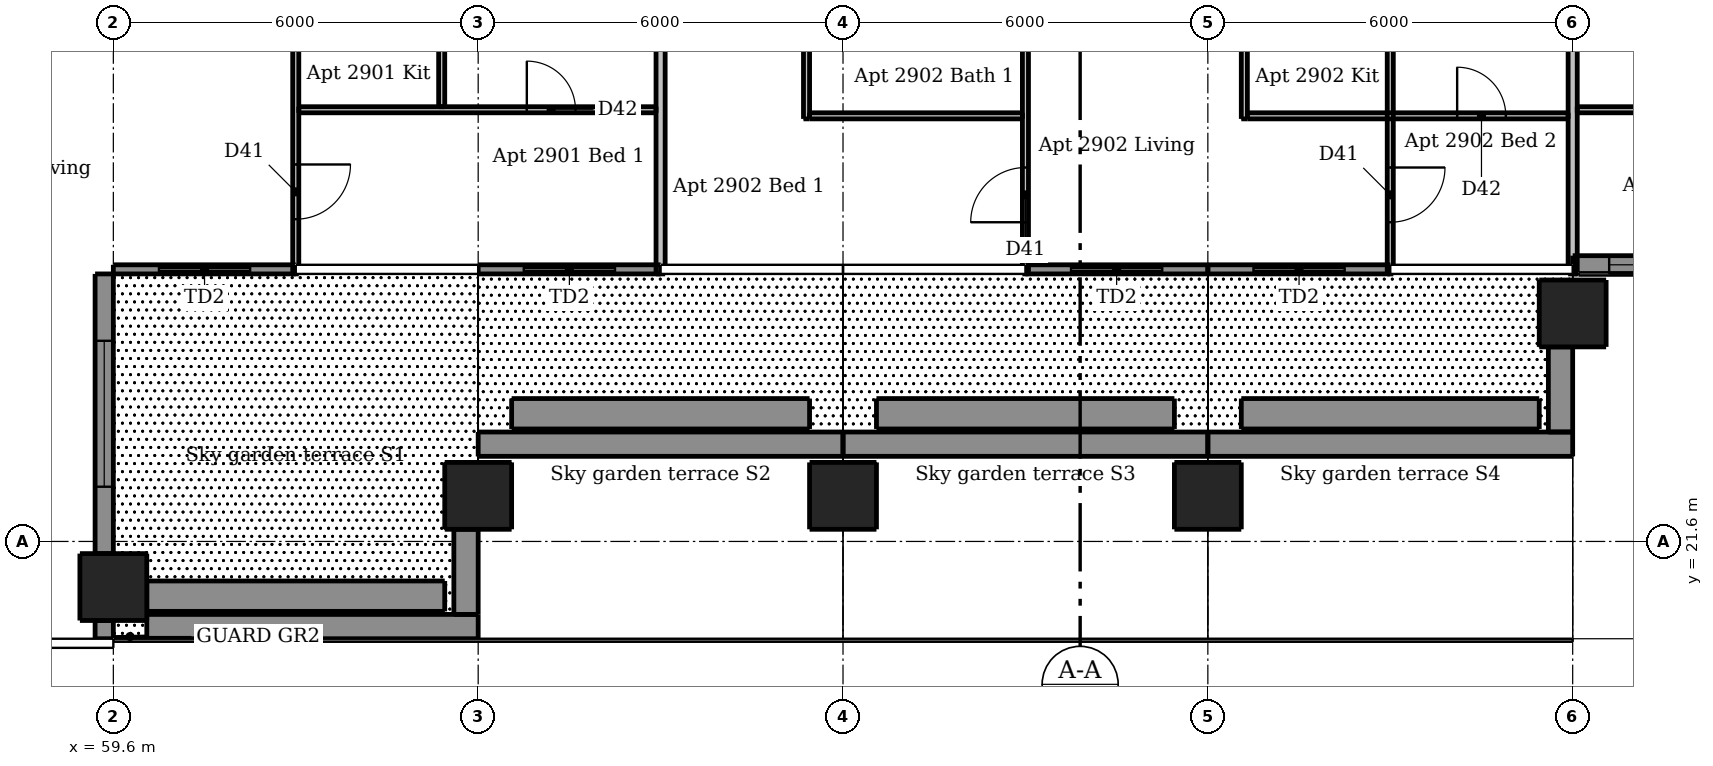
"""IFC4 building model, lengths in metres.
Left out: names, types, materials, properties, quantities, classifications, styles, units other than length and angle.
Written with IfcOpenShell. Run it as: python <this file> out.ifc"""

import sys

from ifc_helpers import new_model, si_unit, direction, frame, frame_2d, origin, origin_2d, place, context, subcontext, project, spatial, rectangle, extrude, element, fill, save


model = new_model("IFC4")
c1 = context("Model", 3, precision=1e-05, world=origin(), true_north=direction((0.0, 1.0)))
c2 = subcontext(c1, "Body", "Model", "MODEL_VIEW")
j1 = project(units=[si_unit("LENGTHUNIT", "METRE"), si_unit("PLANEANGLEUNIT", "RADIAN")], contexts=[c1])
p1 = place(None, origin())
s1 = spatial("IfcSite", under=j1, at=p1, CompositionType="ELEMENT")
p2 = place(p1, origin())
s2 = spatial("IfcBuilding", under=s1, at=p2, CompositionType="ELEMENT")
p3 = place(p2, frame((0.0, 0.0, 108.4)))
s3 = spatial("IfcBuildingStorey", under=s2, at=p3, CompositionType="ELEMENT", Elevation=108.4)
for number, where, z_axis, x_axis in (
    (1, (59.6, 20.85, 0.0), (0.0, 0.0, 1.0), (1.0, 0.0, 0.0)),
    (2, (65.6, 22.35, 0.0), (0.0, 0.0, 1.0), (1.0, 0.0, 0.0)),
    (3, (71.6, 22.35, 0.0), (0.0, 0.0, 1.0), (1.0, 0.0, 0.0)),
    (4, (77.6, 22.35, 0.0), (0.0, 0.0, 1.0), (1.0, 0.0, 0.0)),
    (5, (83.6, 25.35, 0.0), (0.0, 0.0, 1.0), (1.0, 0.0, 0.0)),
):
    element("IfcColumn", number, at=place(p3, frame(where, z_axis=z_axis, x_axis=x_axis)), inside=s3, PredefinedType="COLUMN", context=c2, shape_type="SweptSolid", body=[
        extrude(rectangle(XDim=1.1, YDim=1.1, at=origin_2d()), origin(), (0.0, 0.0, 1.0), 3.3),
    ])
p4 = place(p3, frame((59.45, 20.0, 0.0), z_axis=(0.0, 0.0, 1.0), x_axis=(0.0, 1.0, 0.0)))
e6 = element("IfcWall", 6, at=p4, inside=s3, PredefinedType="SOLIDWALL", context=c2, shape_type="SweptSolid", body=[
    extrude(rectangle(XDim=0.3, YDim=0.3, at=frame_2d((0.15, 0.0))), origin(), (0.0, 0.0, 1.0), 3.05),
])
p5 = place(p3, frame((59.45, 21.4, 0.0), z_axis=(0.0, 0.0, 1.0), x_axis=(0.0, 1.0, 0.0)))
e7 = element("IfcWall", 7, at=p5, inside=s3, PredefinedType="SOLIDWALL", context=c2, shape_type="SweptSolid", body=[
    extrude(rectangle(XDim=4.6, YDim=0.3, at=frame_2d((2.3, 0.0))), origin(), (0.0, 0.0, 1.0), 3.05),
])
p6 = place(p5, frame((1.1, 0.0, 0.15)))
e8 = element("IfcOpeningElement", 8, at=p6, cuts=e7, PredefinedType="OPENING", context=c2, shape_type="SweptSolid", body=[
    extrude(rectangle(XDim=2.4, YDim=2.1, at=frame_2d((1.2, 1.05))), frame((0.0, 0.16, 0.0), z_axis=(0.0, -1.0, 0.0), x_axis=(1.0, 0.0, 0.0)), (0.0, 0.0, 1.0), 0.32),
])
p7 = place(p3, frame((59.6, 26.075, 0.0), z_axis=(0.0, 0.0, 1.0), x_axis=(1.0, 0.0, 0.0)))
e9 = element("IfcWall", 9, at=p7, inside=s3, PredefinedType="SOLIDWALL", context=c2, shape_type="SweptSolid", body=[
    extrude(rectangle(XDim=3.0, YDim=0.15, at=frame_2d((1.5, 0.0))), origin(), (0.0, 0.0, 1.0), 3.05),
])
p8 = place(p7, frame((0.75, 0.0, 0.0)))
e10 = element("IfcOpeningElement", 10, at=p8, cuts=e9, PredefinedType="OPENING", context=c2, shape_type="SweptSolid", body=[
    extrude(rectangle(XDim=1.5, YDim=2.4, at=frame_2d((0.75, 1.2))), frame((0.0, 0.085, 0.0), z_axis=(0.0, -1.0, 0.0), x_axis=(1.0, 0.0, 0.0)), (0.0, 0.0, 1.0), 0.17),
])
p9 = place(p3, frame((65.6, 26.075, 0.0), z_axis=(0.0, 0.0, 1.0), x_axis=(1.0, 0.0, 0.0)))
e11 = element("IfcWall", 11, at=p9, inside=s3, PredefinedType="SOLIDWALL", context=c2, shape_type="SweptSolid", body=[
    extrude(rectangle(XDim=3.0, YDim=0.15, at=frame_2d((1.5, 0.0))), origin(), (0.0, 0.0, 1.0), 3.05),
])
p10 = place(p9, frame((0.75, 0.0, 0.0)))
e12 = element("IfcOpeningElement", 12, at=p10, cuts=e11, PredefinedType="OPENING", context=c2, shape_type="SweptSolid", body=[
    extrude(rectangle(XDim=1.5, YDim=2.4, at=frame_2d((0.75, 1.2))), frame((0.0, 0.085, 0.0), z_axis=(0.0, -1.0, 0.0), x_axis=(1.0, 0.0, 0.0)), (0.0, 0.0, 1.0), 0.17),
])
p11 = place(p3, frame((74.6, 26.075, 0.0), z_axis=(0.0, 0.0, 1.0), x_axis=(1.0, 0.0, 0.0)))
e13 = element("IfcWall", 13, at=p11, inside=s3, PredefinedType="SOLIDWALL", context=c2, shape_type="SweptSolid", body=[
    extrude(rectangle(XDim=3.0, YDim=0.15, at=frame_2d((1.5, 0.0))), origin(), (0.0, 0.0, 1.0), 3.05),
])
p12 = place(p11, frame((0.75, 0.0, 0.0)))
e14 = element("IfcOpeningElement", 14, at=p12, cuts=e13, PredefinedType="OPENING", context=c2, shape_type="SweptSolid", body=[
    extrude(rectangle(XDim=1.5, YDim=2.4, at=frame_2d((0.75, 1.2))), frame((0.0, 0.085, 0.0), z_axis=(0.0, -1.0, 0.0), x_axis=(1.0, 0.0, 0.0)), (0.0, 0.0, 1.0), 0.17),
])
p13 = place(p3, frame((77.6, 26.075, 0.0), z_axis=(0.0, 0.0, 1.0), x_axis=(1.0, 0.0, 0.0)))
e15 = element("IfcWall", 15, at=p13, inside=s3, PredefinedType="SOLIDWALL", context=c2, shape_type="SweptSolid", body=[
    extrude(rectangle(XDim=3.0, YDim=0.15, at=frame_2d((1.5, 0.0))), origin(), (0.0, 0.0, 1.0), 3.05),
])
p14 = place(p13, frame((0.75, 0.0, 0.0)))
e16 = element("IfcOpeningElement", 16, at=p14, cuts=e15, PredefinedType="OPENING", context=c2, shape_type="SweptSolid", body=[
    extrude(rectangle(XDim=1.5, YDim=2.4, at=frame_2d((0.75, 1.2))), frame((0.0, 0.085, 0.0), z_axis=(0.0, -1.0, 0.0), x_axis=(1.0, 0.0, 0.0)), (0.0, 0.0, 1.0), 0.17),
])
p15 = place(p3, frame((83.6, 26.15, 0.0), z_axis=(0.0, 0.0, 1.0), x_axis=(1.0, 0.0, 0.0)))
e17 = element("IfcWall", 17, at=p15, inside=s3, PredefinedType="SOLIDWALL", context=c2, shape_type="SweptSolid", body=[
    extrude(rectangle(XDim=5.89, YDim=0.3, at=frame_2d((2.945, 0.0))), origin(), (0.0, 0.0, 1.0), 3.05),
])
p16 = place(p15, frame((0.6, 0.0, 0.15)))
e18 = element("IfcOpeningElement", 18, at=p16, cuts=e17, PredefinedType="OPENING", context=c2, shape_type="SweptSolid", body=[
    extrude(rectangle(XDim=1.8, YDim=2.1, at=frame_2d((0.9, 1.05))), frame((0.0, 0.16, 0.0), z_axis=(0.0, -1.0, 0.0), x_axis=(1.0, 0.0, 0.0)), (0.0, 0.0, 1.0), 0.32),
])
p17 = place(p15, frame((3.6, 0.0, 0.15)))
e19 = element("IfcOpeningElement", 19, at=p17, cuts=e17, PredefinedType="OPENING", context=c2, shape_type="SweptSolid", body=[
    extrude(rectangle(XDim=1.8, YDim=2.1, at=frame_2d((0.9, 1.05))), frame((0.0, 0.16, 0.0), z_axis=(0.0, -1.0, 0.0), x_axis=(1.0, 0.0, 0.0)), (0.0, 0.0, 1.0), 0.32),
])
p18 = place(p3, frame((60.15, 20.2, 0.03), z_axis=(0.0, 0.0, 1.0), x_axis=(1.0, 0.0, 0.0)))
e20 = element("IfcWall", 20, at=p18, inside=s3, PredefinedType="PARAPET", context=c2, shape_type="SweptSolid", body=[
    extrude(rectangle(XDim=5.45, YDim=0.4, at=frame_2d((2.725, 0.0))), origin(), (0.0, 0.0, 1.0), 1.1),
])
p19 = place(p3, frame((65.4, 20.4, 0.03), z_axis=(0.0, 0.0, 1.0), x_axis=(0.0, 1.0, 0.0)))
e21 = element("IfcWall", 21, at=p19, inside=s3, PredefinedType="PARAPET", context=c2, shape_type="SweptSolid", body=[
    extrude(rectangle(XDim=1.4, YDim=0.4, at=frame_2d((0.7, 0.0))), origin(), (0.0, 0.0, 1.0), 1.1),
])
p20 = place(p3, frame((60.15, 20.7, 0.03), z_axis=(0.0, 0.0, 1.0), x_axis=(1.0, 0.0, 0.0)))
e22 = element("IfcWall", 22, at=p20, inside=s3, PredefinedType="SOLIDWALL", context=c2, shape_type="SweptSolid", body=[
    extrude(rectangle(XDim=4.9, YDim=0.5, at=frame_2d((2.45, 0.0))), origin(), (0.0, 0.0, 1.0), 0.6),
])
p21 = place(p3, frame((65.6, 23.2, 0.03), z_axis=(0.0, 0.0, 1.0), x_axis=(1.0, 0.0, 0.0)))
e23 = element("IfcWall", 23, at=p21, inside=s3, PredefinedType="PARAPET", context=c2, shape_type="SweptSolid", body=[
    extrude(rectangle(XDim=6.0, YDim=0.4, at=frame_2d((3.0, 0.0))), origin(), (0.0, 0.0, 1.0), 1.1),
])
p22 = place(p3, frame((66.15, 23.7, 0.03), z_axis=(0.0, 0.0, 1.0), x_axis=(1.0, 0.0, 0.0)))
e24 = element("IfcWall", 24, at=p22, inside=s3, PredefinedType="SOLIDWALL", context=c2, shape_type="SweptSolid", body=[
    extrude(rectangle(XDim=4.9, YDim=0.5, at=frame_2d((2.45, 0.0))), origin(), (0.0, 0.0, 1.0), 0.6),
])
p23 = place(p3, frame((71.6, 23.2, 0.03), z_axis=(0.0, 0.0, 1.0), x_axis=(1.0, 0.0, 0.0)))
e25 = element("IfcWall", 25, at=p23, inside=s3, PredefinedType="PARAPET", context=c2, shape_type="SweptSolid", body=[
    extrude(rectangle(XDim=6.0, YDim=0.4, at=frame_2d((3.0, 0.0))), origin(), (0.0, 0.0, 1.0), 1.1),
])
p24 = place(p3, frame((72.15, 23.7, 0.03), z_axis=(0.0, 0.0, 1.0), x_axis=(1.0, 0.0, 0.0)))
e26 = element("IfcWall", 26, at=p24, inside=s3, PredefinedType="SOLIDWALL", context=c2, shape_type="SweptSolid", body=[
    extrude(rectangle(XDim=4.9, YDim=0.5, at=frame_2d((2.45, 0.0))), origin(), (0.0, 0.0, 1.0), 0.6),
])
p25 = place(p3, frame((77.6, 23.2, 0.03), z_axis=(0.0, 0.0, 1.0), x_axis=(1.0, 0.0, 0.0)))
e27 = element("IfcWall", 27, at=p25, inside=s3, PredefinedType="PARAPET", context=c2, shape_type="SweptSolid", body=[
    extrude(rectangle(XDim=6.0, YDim=0.4, at=frame_2d((3.0, 0.0))), origin(), (0.0, 0.0, 1.0), 1.1),
])
p26 = place(p3, frame((83.4, 23.4, 0.03), z_axis=(0.0, 0.0, 1.0), x_axis=(0.0, 1.0, 0.0)))
e28 = element("IfcWall", 28, at=p26, inside=s3, PredefinedType="PARAPET", context=c2, shape_type="SweptSolid", body=[
    extrude(rectangle(XDim=1.4, YDim=0.4, at=frame_2d((0.7, 0.0))), origin(), (0.0, 0.0, 1.0), 1.1),
])
p27 = place(p3, frame((78.15, 23.7, 0.03), z_axis=(0.0, 0.0, 1.0), x_axis=(1.0, 0.0, 0.0)))
e29 = element("IfcWall", 29, at=p27, inside=s3, PredefinedType="SOLIDWALL", context=c2, shape_type="SweptSolid", body=[
    extrude(rectangle(XDim=4.9, YDim=0.5, at=frame_2d((2.45, 0.0))), origin(), (0.0, 0.0, 1.0), 0.6),
])
p28 = place(p3, frame((62.6, 31.625, 0.0), z_axis=(0.0, 0.0, 1.0), x_axis=(0.0, -1.0, 0.0)))
e30 = element("IfcWall", 30, at=p28, inside=s3, PredefinedType="PARTITIONING", context=c2, shape_type="SweptSolid", body=[
    extrude(rectangle(XDim=5.625, YDim=0.1, at=frame_2d((2.812, 0.0))), origin(), (0.0, 0.0, 1.0), 3.05),
])
p29 = place(p28, frame((0.975, 0.0, 0.0)))
e31 = element("IfcOpeningElement", 31, at=p29, cuts=e30, PredefinedType="OPENING", context=c2, shape_type="SweptSolid", body=[
    extrude(rectangle(XDim=0.9, YDim=2.1, at=frame_2d((0.45, 1.05))), frame((0.0, 0.06, 0.0), z_axis=(0.0, -1.0, 0.0), x_axis=(1.0, 0.0, 0.0)), (0.0, 0.0, 1.0), 0.12),
])
p30 = place(p28, frame((3.825, 0.0, 0.0)))
e32 = element("IfcOpeningElement", 32, at=p30, cuts=e30, PredefinedType="OPENING", context=c2, shape_type="SweptSolid", body=[
    extrude(rectangle(XDim=0.9, YDim=2.1, at=frame_2d((0.45, 1.05))), frame((0.0, 0.06, 0.0), z_axis=(0.0, -1.0, 0.0), x_axis=(1.0, 0.0, 0.0)), (0.0, 0.0, 1.0), 0.12),
])
p31 = place(p3, frame((65.0, 28.75, 0.0), z_axis=(0.0, 0.0, 1.0), x_axis=(0.0, 1.0, 0.0)))
e33 = element("IfcWall", 33, at=p31, inside=s3, PredefinedType="PARTITIONING", context=c2, shape_type="SweptSolid", body=[
    extrude(rectangle(XDim=2.875, YDim=0.1, at=frame_2d((1.438, 0.0))), origin(), (0.0, 0.0, 1.0), 3.05),
])
p32 = place(p3, frame((71.0, 28.55, 0.0), z_axis=(0.0, 0.0, 1.0), x_axis=(0.0, 1.0, 0.0)))
e34 = element("IfcWall", 34, at=p32, inside=s3, PredefinedType="PARTITIONING", context=c2, shape_type="SweptSolid", body=[
    extrude(rectangle(XDim=3.075, YDim=0.1, at=frame_2d((1.538, 0.0))), origin(), (0.0, 0.0, 1.0), 3.05),
])
p33 = place(p3, frame((74.6, 26.0, 0.0), z_axis=(0.0, 0.0, 1.0), x_axis=(0.0, 1.0, 0.0)))
e35 = element("IfcWall", 35, at=p33, inside=s3, PredefinedType="PARTITIONING", context=c2, shape_type="SweptSolid", body=[
    extrude(rectangle(XDim=5.625, YDim=0.1, at=frame_2d((2.812, 0.0))), origin(), (0.0, 0.0, 1.0), 3.05),
])
p34 = place(p33, frame((0.85, 0.0, 0.0)))
e36 = element("IfcOpeningElement", 36, at=p34, cuts=e35, PredefinedType="OPENING", context=c2, shape_type="SweptSolid", body=[
    extrude(rectangle(XDim=0.9, YDim=2.1, at=frame_2d((0.45, 1.05))), frame((0.0, 0.06, 0.0), z_axis=(0.0, -1.0, 0.0), x_axis=(1.0, 0.0, 0.0)), (0.0, 0.0, 1.0), 0.12),
])
p35 = place(p33, frame((3.75, 0.0, 0.0)))
e37 = element("IfcOpeningElement", 37, at=p35, cuts=e35, PredefinedType="OPENING", context=c2, shape_type="SweptSolid", body=[
    extrude(rectangle(XDim=0.8, YDim=2.1, at=frame_2d((0.4, 1.05))), frame((0.0, 0.06, 0.0), z_axis=(0.0, -1.0, 0.0), x_axis=(1.0, 0.0, 0.0)), (0.0, 0.0, 1.0), 0.12),
])
p36 = place(p3, frame((78.2, 31.625, 0.0), z_axis=(0.0, 0.0, 1.0), x_axis=(0.0, -1.0, 0.0)))
e38 = element("IfcWall", 38, at=p36, inside=s3, PredefinedType="PARTITIONING", context=c2, shape_type="SweptSolid", body=[
    extrude(rectangle(XDim=3.075, YDim=0.1, at=frame_2d((1.538, 0.0))), origin(), (0.0, 0.0, 1.0), 3.05),
])
p37 = place(p36, frame((1.025, 0.0, 0.0)))
e39 = element("IfcOpeningElement", 39, at=p37, cuts=e38, PredefinedType="OPENING", context=c2, shape_type="SweptSolid", body=[
    extrude(rectangle(XDim=0.9, YDim=2.1, at=frame_2d((0.45, 1.05))), frame((0.0, 0.06, 0.0), z_axis=(0.0, -1.0, 0.0), x_axis=(1.0, 0.0, 0.0)), (0.0, 0.0, 1.0), 0.12),
])
p38 = place(p3, frame((80.6, 31.625, 0.0), z_axis=(0.0, 0.0, 1.0), x_axis=(0.0, -1.0, 0.0)))
e40 = element("IfcWall", 40, at=p38, inside=s3, PredefinedType="PARTITIONING", context=c2, shape_type="SweptSolid", body=[
    extrude(rectangle(XDim=5.625, YDim=0.1, at=frame_2d((2.812, 0.0))), origin(), (0.0, 0.0, 1.0), 3.05),
])
p39 = place(p38, frame((3.875, 0.0, 0.0)))
e41 = element("IfcOpeningElement", 41, at=p39, cuts=e40, PredefinedType="OPENING", context=c2, shape_type="SweptSolid", body=[
    extrude(rectangle(XDim=0.9, YDim=2.1, at=frame_2d((0.45, 1.05))), frame((0.0, 0.06, 0.0), z_axis=(0.0, -1.0, 0.0), x_axis=(1.0, 0.0, 0.0)), (0.0, 0.0, 1.0), 0.12),
])
p40 = place(p3, frame((62.65, 28.7, 0.0), z_axis=(0.0, 0.0, 1.0), x_axis=(1.0, 0.0, 0.0)))
e42 = element("IfcWall", 42, at=p40, inside=s3, PredefinedType="PARTITIONING", context=c2, shape_type="SweptSolid", body=[
    extrude(rectangle(XDim=5.875, YDim=0.1, at=frame_2d((2.938, 0.0))), origin(), (0.0, 0.0, 1.0), 3.05),
])
p41 = place(p40, frame((3.75, 0.0, 0.0)))
e43 = element("IfcOpeningElement", 43, at=p41, cuts=e42, PredefinedType="OPENING", context=c2, shape_type="SweptSolid", body=[
    extrude(rectangle(XDim=0.8, YDim=2.1, at=frame_2d((0.4, 1.05))), frame((0.0, 0.06, 0.0), z_axis=(0.0, -1.0, 0.0), x_axis=(1.0, 0.0, 0.0)), (0.0, 0.0, 1.0), 0.12),
])
p42 = place(p3, frame((83.675, 28.7, 0.0), z_axis=(0.0, 0.0, 1.0), x_axis=(1.0, 0.0, 0.0)))
e44 = element("IfcWall", 44, at=p42, inside=s3, PredefinedType="PARTITIONING", context=c2, shape_type="SweptSolid", body=[
    extrude(rectangle(XDim=1.975, YDim=0.1, at=frame_2d((0.987, 0.0))), origin(), (0.0, 0.0, 1.0), 3.05),
])
p43 = place(p3, frame((71.05, 28.6, 0.0), z_axis=(0.0, 0.0, 1.0), x_axis=(1.0, 0.0, 0.0)))
e45 = element("IfcWall", 45, at=p43, inside=s3, PredefinedType="PARTITIONING", context=c2, shape_type="SweptSolid", body=[
    extrude(rectangle(XDim=3.5, YDim=0.1, at=frame_2d((1.75, 0.0))), origin(), (0.0, 0.0, 1.0), 3.05),
])
p44 = place(p3, frame((78.25, 28.6, 0.0), z_axis=(0.0, 0.0, 1.0), x_axis=(1.0, 0.0, 0.0)))
e46 = element("IfcWall", 46, at=p44, inside=s3, PredefinedType="PARTITIONING", context=c2, shape_type="SweptSolid", body=[
    extrude(rectangle(XDim=5.275, YDim=0.1, at=frame_2d((2.637, 0.0))), origin(), (0.0, 0.0, 1.0), 3.05),
])
p45 = place(p44, frame((3.45, 0.0, 0.0)))
e47 = element("IfcOpeningElement", 47, at=p45, cuts=e46, PredefinedType="OPENING", context=c2, shape_type="SweptSolid", body=[
    extrude(rectangle(XDim=0.8, YDim=2.1, at=frame_2d((0.4, 1.05))), frame((0.0, 0.06, 0.0), z_axis=(0.0, -1.0, 0.0), x_axis=(1.0, 0.0, 0.0)), (0.0, 0.0, 1.0), 0.12),
])
p46 = place(p3, frame((68.6, 26.0, 0.0), z_axis=(0.0, 0.0, 1.0), x_axis=(0.0, 1.0, 0.0)))
e48 = element("IfcWall", 48, at=p46, inside=s3, PredefinedType="PARTITIONING", context=c2, shape_type="SweptSolid", body=[
    extrude(rectangle(XDim=5.625, YDim=0.15, at=frame_2d((2.812, 0.0))), origin(), (0.0, 0.0, 1.0), 3.05),
])
p47 = place(p3, frame((83.6, 26.0, 0.0), z_axis=(0.0, 0.0, 1.0), x_axis=(0.0, 1.0, 0.0)))
e49 = element("IfcWall", 49, at=p47, inside=s3, PredefinedType="PARTITIONING", context=c2, shape_type="SweptSolid", body=[
    extrude(rectangle(XDim=5.625, YDim=0.15, at=frame_2d((2.812, 0.0))), origin(), (0.0, 0.0, 1.0), 2.59),
])
p48 = place(p6, origin())
e50 = element("IfcWindow", 50, at=p48, inside=s3, PartitioningType="DOUBLE_PANEL_VERTICAL", PredefinedType="WINDOW", context=c2, shape_type="SweptSolid", body=[
    extrude(rectangle(XDim=2.4, YDim=2.1, at=frame_2d((1.2, 1.05))), frame((0.0, 0.03, 0.0), z_axis=(0.0, -1.0, 0.0), x_axis=(1.0, 0.0, 0.0)), (0.0, 0.0, 1.0), 0.06),
])
fill(e8, e50)
p49 = place(p8, origin())
e51 = element("IfcDoor", 51, at=p49, inside=s3, OperationType="DOUBLE_DOOR_SLIDING", PredefinedType="DOOR", context=c2, shape_type="SweptSolid", body=[
    extrude(rectangle(XDim=1.5, YDim=2.4, at=frame_2d((0.75, 1.2))), frame((0.0, 0.025, 0.0), z_axis=(0.0, -1.0, 0.0), x_axis=(1.0, 0.0, 0.0)), (0.0, 0.0, 1.0), 0.05),
])
fill(e10, e51)
p50 = place(p10, origin())
e52 = element("IfcDoor", 52, at=p50, inside=s3, OperationType="DOUBLE_DOOR_SLIDING", PredefinedType="DOOR", context=c2, shape_type="SweptSolid", body=[
    extrude(rectangle(XDim=1.5, YDim=2.4, at=frame_2d((0.75, 1.2))), frame((0.0, 0.025, 0.0), z_axis=(0.0, -1.0, 0.0), x_axis=(1.0, 0.0, 0.0)), (0.0, 0.0, 1.0), 0.05),
])
fill(e12, e52)
p51 = place(p12, origin())
e53 = element("IfcDoor", 53, at=p51, inside=s3, OperationType="DOUBLE_DOOR_SLIDING", PredefinedType="DOOR", context=c2, shape_type="SweptSolid", body=[
    extrude(rectangle(XDim=1.5, YDim=2.4, at=frame_2d((0.75, 1.2))), frame((0.0, 0.025, 0.0), z_axis=(0.0, -1.0, 0.0), x_axis=(1.0, 0.0, 0.0)), (0.0, 0.0, 1.0), 0.05),
])
fill(e14, e53)
p52 = place(p14, origin())
e54 = element("IfcDoor", 54, at=p52, inside=s3, OperationType="DOUBLE_DOOR_SLIDING", PredefinedType="DOOR", context=c2, shape_type="SweptSolid", body=[
    extrude(rectangle(XDim=1.5, YDim=2.4, at=frame_2d((0.75, 1.2))), frame((0.0, 0.025, 0.0), z_axis=(0.0, -1.0, 0.0), x_axis=(1.0, 0.0, 0.0)), (0.0, 0.0, 1.0), 0.05),
])
fill(e16, e54)
p53 = place(p16, origin())
e55 = element("IfcWindow", 55, at=p53, inside=s3, PartitioningType="DOUBLE_PANEL_VERTICAL", PredefinedType="WINDOW", context=c2, shape_type="SweptSolid", body=[
    extrude(rectangle(XDim=1.8, YDim=2.1, at=frame_2d((0.9, 1.05))), frame((0.0, 0.03, 0.0), z_axis=(0.0, -1.0, 0.0), x_axis=(1.0, 0.0, 0.0)), (0.0, 0.0, 1.0), 0.06),
])
fill(e18, e55)
p54 = place(p30, origin())
e56 = element("IfcDoor", 56, at=p54, inside=s3, OperationType="SINGLE_SWING_LEFT", PredefinedType="DOOR", context=c2, shape_type="SweptSolid", body=[
    extrude(rectangle(XDim=0.9, YDim=2.1, at=frame_2d((0.45, 1.05))), frame((0.0, 0.025, 0.0), z_axis=(0.0, -1.0, 0.0), x_axis=(1.0, 0.0, 0.0)), (0.0, 0.0, 1.0), 0.05),
])
fill(e32, e56)
p55 = place(p41, origin())
e57 = element("IfcDoor", 57, at=p55, inside=s3, OperationType="SINGLE_SWING_LEFT", PredefinedType="DOOR", context=c2, shape_type="SweptSolid", body=[
    extrude(rectangle(XDim=0.8, YDim=2.1, at=frame_2d((0.4, 1.05))), frame((0.0, 0.025, 0.0), z_axis=(0.0, -1.0, 0.0), x_axis=(1.0, 0.0, 0.0)), (0.0, 0.0, 1.0), 0.05),
])
fill(e43, e57)
p56 = place(p34, origin())
e58 = element("IfcDoor", 58, at=p56, inside=s3, OperationType="SINGLE_SWING_LEFT", PredefinedType="DOOR", context=c2, shape_type="SweptSolid", body=[
    extrude(rectangle(XDim=0.9, YDim=2.1, at=frame_2d((0.45, 1.05))), frame((0.0, 0.025, 0.0), z_axis=(0.0, -1.0, 0.0), x_axis=(1.0, 0.0, 0.0)), (0.0, 0.0, 1.0), 0.05),
])
fill(e36, e58)
p57 = place(p39, origin())
e59 = element("IfcDoor", 59, at=p57, inside=s3, OperationType="SINGLE_SWING_LEFT", PredefinedType="DOOR", context=c2, shape_type="SweptSolid", body=[
    extrude(rectangle(XDim=0.9, YDim=2.1, at=frame_2d((0.45, 1.05))), frame((0.0, 0.025, 0.0), z_axis=(0.0, -1.0, 0.0), x_axis=(1.0, 0.0, 0.0)), (0.0, 0.0, 1.0), 0.05),
])
fill(e41, e59)
p58 = place(p45, origin())
e60 = element("IfcDoor", 60, at=p58, inside=s3, OperationType="SINGLE_SWING_LEFT", PredefinedType="DOOR", context=c2, shape_type="SweptSolid", body=[
    extrude(rectangle(XDim=0.8, YDim=2.1, at=frame_2d((0.4, 1.05))), frame((0.0, 0.025, 0.0), z_axis=(0.0, -1.0, 0.0), x_axis=(1.0, 0.0, 0.0)), (0.0, 0.0, 1.0), 0.05),
])
fill(e47, e60)
save(model, sys.argv[1])
